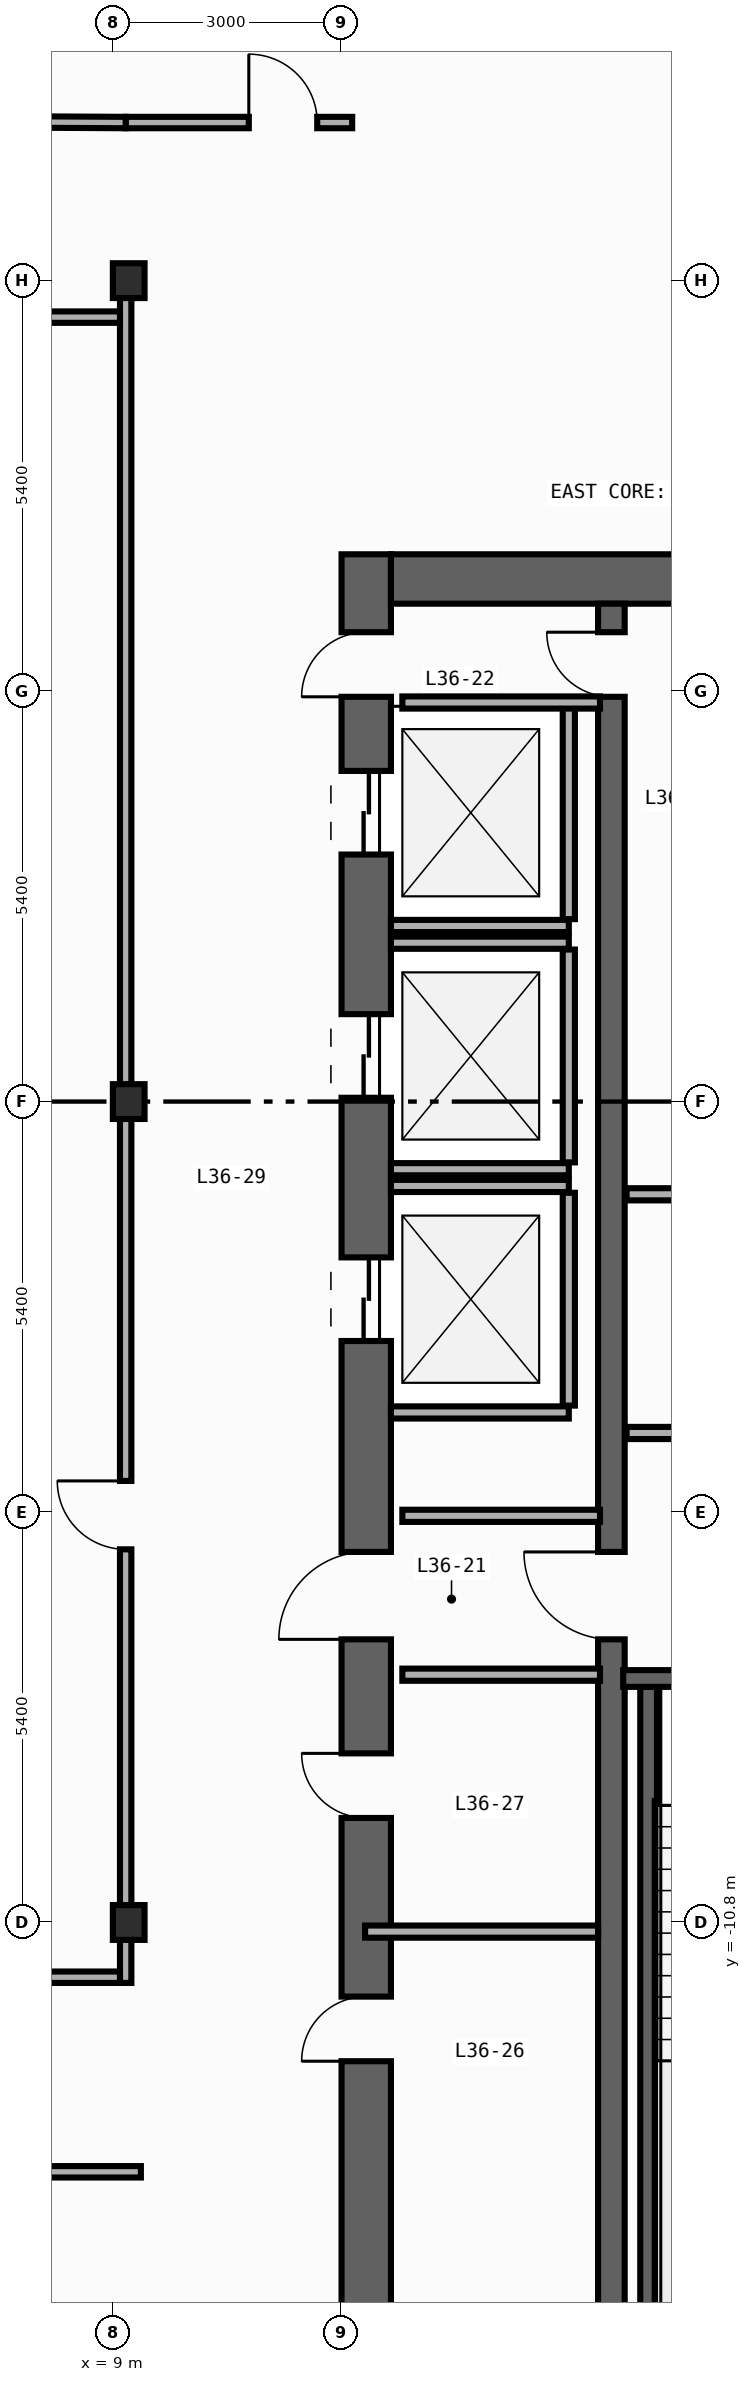
"""IFC4 building model, lengths in metres.
Left out: names, types, materials, properties, quantities, classifications, styles, units other than length and angle.
Written with IfcOpenShell. Run it as: python <this file> out.ifc"""

import sys

from ifc_helpers import new_model, si_unit, direction, frame, frame_2d, origin, origin_2d, place, context, subcontext, project, spatial, rectangle, i_section, extrude, element, fill, save


model = new_model("IFC4")
c1 = context("Model", 3, precision=1e-05, world=origin(), true_north=direction((0.0, 1.0)))
c2 = subcontext(c1, "Body", "Model", "MODEL_VIEW")
j1 = project(units=[si_unit("LENGTHUNIT", "METRE"), si_unit("PLANEANGLEUNIT", "RADIAN")], contexts=[c1])
p1 = place(None, origin())
s1 = spatial("IfcSite", under=j1, at=p1, CompositionType="ELEMENT")
p2 = place(p1, origin())
s2 = spatial("IfcBuilding", under=s1, at=p2, CompositionType="ELEMENT")
p3 = place(p2, frame((0.0, 0.0, 160.4)))
s3 = spatial("IfcBuildingStorey", under=s2, at=p3, CompositionType="ELEMENT", Elevation=160.4)
p4 = place(p3, frame((12.325, -19.8, 0.0), z_axis=(0.0, 0.0, 1.0), x_axis=(0.0, 1.0, 0.0)))
e1 = element("IfcWall", 1, at=p4, inside=s3, PredefinedType="SHEAR", context=c2, shape_type="SweptSolid", body=[
    extrude(rectangle(XDim=27.0, YDim=0.65, at=frame_2d((13.5, 0.0))), origin(), (0.0, 0.0, 1.0), 4.34),
])
p5 = place(p4, frame((23.05, 0.0, 0.0)))
e2 = element("IfcOpeningElement", 2, at=p5, cuts=e1, PredefinedType="OPENING", context=c2, shape_type="SweptSolid", body=[
    extrude(rectangle(XDim=1.1, YDim=2.2, at=frame_2d((0.55, 1.1))), frame((0.0, 0.335, 0.0), z_axis=(0.0, -1.0, 0.0), x_axis=(1.0, 0.0, 0.0)), (0.0, 0.0, 1.0), 0.67),
])
p6 = place(p4, frame((19.85, 0.0, 0.0)))
e3 = element("IfcOpeningElement", 3, at=p6, cuts=e1, PredefinedType="OPENING", context=c2, shape_type="SweptSolid", body=[
    extrude(rectangle(XDim=1.1, YDim=2.2, at=frame_2d((0.55, 1.1))), frame((0.0, 0.335, 0.0), z_axis=(0.0, -1.0, 0.0), x_axis=(1.0, 0.0, 0.0)), (0.0, 0.0, 1.0), 0.67),
])
p7 = place(p4, frame((16.65, 0.0, 0.0)))
e4 = element("IfcOpeningElement", 4, at=p7, cuts=e1, PredefinedType="OPENING", context=c2, shape_type="SweptSolid", body=[
    extrude(rectangle(XDim=1.1, YDim=2.2, at=frame_2d((0.55, 1.1))), frame((0.0, 0.335, 0.0), z_axis=(0.0, -1.0, 0.0), x_axis=(1.0, 0.0, 0.0)), (0.0, 0.0, 1.0), 0.67),
])
p8 = place(p4, frame((7.175, 0.0, 0.0)))
e5 = element("IfcOpeningElement", 5, at=p8, cuts=e1, PredefinedType="OPENING", context=c2, shape_type="SweptSolid", body=[
    extrude(rectangle(XDim=0.85, YDim=2.1, at=frame_2d((0.425, 1.05))), frame((0.0, 0.335, 0.0), z_axis=(0.0, -1.0, 0.0), x_axis=(1.0, 0.0, 0.0)), (0.0, 0.0, 1.0), 0.67),
])
p9 = place(p4, frame((10.375, 0.0, 0.0)))
e6 = element("IfcOpeningElement", 6, at=p9, cuts=e1, PredefinedType="OPENING", context=c2, shape_type="SweptSolid", body=[
    extrude(rectangle(XDim=0.85, YDim=2.1, at=frame_2d((0.425, 1.05))), frame((0.0, 0.335, 0.0), z_axis=(0.0, -1.0, 0.0), x_axis=(1.0, 0.0, 0.0)), (0.0, 0.0, 1.0), 0.67),
])
p10 = place(p4, frame((12.725, 0.0, 0.0)))
e7 = element("IfcOpeningElement", 7, at=p10, cuts=e1, PredefinedType="OPENING", context=c2, shape_type="SweptSolid", body=[
    extrude(rectangle(XDim=1.15, YDim=2.2, at=frame_2d((0.575, 1.1))), frame((0.0, 0.335, 0.0), z_axis=(0.0, -1.0, 0.0), x_axis=(1.0, 0.0, 0.0)), (0.0, 0.0, 1.0), 0.67),
])
p11 = place(p4, frame((25.125, 0.0, 0.0)))
e8 = element("IfcOpeningElement", 8, at=p11, cuts=e1, PredefinedType="OPENING", context=c2, shape_type="SweptSolid", body=[
    extrude(rectangle(XDim=0.85, YDim=2.1, at=frame_2d((0.425, 1.05))), frame((0.0, 0.335, 0.0), z_axis=(0.0, -1.0, 0.0), x_axis=(1.0, 0.0, 0.0)), (0.0, 0.0, 1.0), 0.67),
])
p12 = place(p3, frame((12.65, 6.875, 0.0), z_axis=(0.0, 0.0, 1.0), x_axis=(1.0, 0.0, 0.0)))
e9 = element("IfcWall", 9, at=p12, inside=s3, PredefinedType="SHEAR", context=c2, shape_type="SweptSolid", body=[
    extrude(rectangle(XDim=7.1, YDim=0.65, at=frame_2d((3.55, 0.0))), origin(), (0.0, 0.0, 1.0), 4.34),
])
p13 = place(p3, frame((15.55, -19.15, 0.0), z_axis=(0.0, 0.0, 1.0), x_axis=(0.0, 1.0, 0.0)))
e10 = element("IfcWall", 10, at=p13, inside=s3, PredefinedType="SHEAR", context=c2, shape_type="SweptSolid", body=[
    extrude(rectangle(XDim=25.7, YDim=0.35, at=frame_2d((12.85, 0.0))), origin(), (0.0, 0.0, 1.0), 4.34),
])
p14 = place(p13, frame((12.075, 0.0, 0.0)))
e11 = element("IfcOpeningElement", 11, at=p14, cuts=e10, PredefinedType="OPENING", context=c2, shape_type="SweptSolid", body=[
    extrude(rectangle(XDim=1.15, YDim=2.2, at=frame_2d((0.575, 1.1))), frame((0.0, 0.185, 0.0), z_axis=(0.0, -1.0, 0.0), x_axis=(1.0, 0.0, 0.0)), (0.0, 0.0, 1.0), 0.37),
])
p15 = place(p13, frame((24.475, 0.0, 0.0)))
e12 = element("IfcOpeningElement", 12, at=p15, cuts=e10, PredefinedType="OPENING", context=c2, shape_type="SweptSolid", body=[
    extrude(rectangle(XDim=0.85, YDim=2.1, at=frame_2d((0.425, 1.05))), frame((0.0, 0.185, 0.0), z_axis=(0.0, -1.0, 0.0), x_axis=(1.0, 0.0, 0.0)), (0.0, 0.0, 1.0), 0.37),
])
p16 = place(p3, frame((16.04, -19.01, 0.0), z_axis=(0.0, 0.0, 1.0), x_axis=(0.0, 1.0, 0.0)))
e13 = element("IfcWall", 13, at=p16, inside=s3, PredefinedType="SHEAR", context=c2, shape_type="SweptSolid", body=[
    extrude(rectangle(XDim=11.42, YDim=0.22, at=frame_2d((5.71, 0.0))), origin(), (0.0, 0.0, 1.0), 4.34),
])
p17 = place(p3, frame((19.77, -7.59, 0.0), z_axis=(0.0, 0.0, 1.0), x_axis=(-1.0, 0.0, 0.0)))
e14 = element("IfcWall", 14, at=p17, inside=s3, PredefinedType="SHEAR", context=c2, shape_type="SweptSolid", body=[
    extrude(rectangle(XDim=4.065, YDim=0.22, at=frame_2d((2.032, 0.0))), origin(), (0.0, 0.0, 1.0), 4.34),
])
p18 = place(p17, frame((1.08, 0.0, 0.0)))
e15 = element("IfcOpeningElement", 15, at=p18, cuts=e14, PredefinedType="OPENING", context=c2, shape_type="SweptSolid", body=[
    extrude(rectangle(XDim=1.1, YDim=2.2, at=frame_2d((0.55, 1.1))), frame((0.0, 0.12, 0.0), z_axis=(0.0, -1.0, 0.0), x_axis=(1.0, 0.0, 0.0)), (0.0, 0.0, 1.0), 0.24),
])
for number, where, z_axis, x_axis in (
    (16, (9.2, -10.8, 0.0), (0.0, 0.0, 1.0), (1.0, 0.0, 0.0)),
    (17, (9.2, 0.0, 0.0), (0.0, 0.0, 1.0), (1.0, 0.0, 0.0)),
    (18, (9.2, 10.8, 0.0), (0.0, 0.0, 1.0), (1.0, 0.0, 0.0)),
):
    element("IfcColumn", number, at=place(p3, frame(where, z_axis=z_axis, x_axis=x_axis)), inside=s3, PredefinedType="COLUMN", context=c2, shape_type="SweptSolid", body=[
        extrude(i_section(OverallWidth=0.417, OverallDepth=0.458, WebThickness=0.03, FlangeThickness=0.05, FilletRadius=0.022, at=origin_2d()), origin(), (0.0, 0.0, 1.0), 4.6),
    ])
p19 = place(p3, frame((12.65, 2.31, 0.0), z_axis=(0.0, 0.0, 1.0), x_axis=(1.0, 0.0, 0.0)))
e19 = element("IfcWall", 19, at=p19, inside=s3, PredefinedType="STANDARD", context=c2, shape_type="SweptSolid", body=[
    extrude(rectangle(XDim=2.34, YDim=0.16, at=frame_2d((1.17, 0.0))), origin(), (0.0, 0.0, 1.0), 4.34),
])
p20 = place(p3, frame((14.99, 2.4, 0.0), z_axis=(0.0, 0.0, 1.0), x_axis=(0.0, 1.0, 0.0)))
e20 = element("IfcWall", 20, at=p20, inside=s3, PredefinedType="STANDARD", context=c2, shape_type="SweptSolid", body=[
    extrude(rectangle(XDim=2.8, YDim=0.16, at=frame_2d((1.4, 0.0))), origin(), (0.0, 0.0, 1.0), 4.34),
])
for number, where, z_axis, x_axis in (
    (21, (12.65, -0.89, 0.0), (0.0, 0.0, 1.0), (1.0, 0.0, 0.0)),
    (22, (12.65, 2.09, 0.0), (0.0, 0.0, 1.0), (1.0, 0.0, 0.0)),
):
    element("IfcWall", number, at=place(p3, frame(where, z_axis=z_axis, x_axis=x_axis)), inside=s3, PredefinedType="STANDARD", context=c2, shape_type="SweptSolid", body=[
        extrude(rectangle(XDim=2.34, YDim=0.16, at=frame_2d((1.17, 0.0))), origin(), (0.0, 0.0, 1.0), 4.34),
    ])
p21 = place(p3, frame((14.99, -0.8, 0.0), z_axis=(0.0, 0.0, 1.0), x_axis=(0.0, 1.0, 0.0)))
e23 = element("IfcWall", 23, at=p21, inside=s3, PredefinedType="STANDARD", context=c2, shape_type="SweptSolid", body=[
    extrude(rectangle(XDim=2.8, YDim=0.16, at=frame_2d((1.4, 0.0))), origin(), (0.0, 0.0, 1.0), 4.34),
])
for number, where, z_axis, x_axis in (
    (24, (12.65, -4.09, 0.0), (0.0, 0.0, 1.0), (1.0, 0.0, 0.0)),
    (25, (12.65, -1.11, 0.0), (0.0, 0.0, 1.0), (1.0, 0.0, 0.0)),
):
    element("IfcWall", number, at=place(p3, frame(where, z_axis=z_axis, x_axis=x_axis)), inside=s3, PredefinedType="STANDARD", context=c2, shape_type="SweptSolid", body=[
        extrude(rectangle(XDim=2.34, YDim=0.16, at=frame_2d((1.17, 0.0))), origin(), (0.0, 0.0, 1.0), 4.34),
    ])
p22 = place(p3, frame((14.99, -4.0, 0.0), z_axis=(0.0, 0.0, 1.0), x_axis=(0.0, 1.0, 0.0)))
e26 = element("IfcWall", 26, at=p22, inside=s3, PredefinedType="STANDARD", context=c2, shape_type="SweptSolid", body=[
    extrude(rectangle(XDim=2.8, YDim=0.16, at=frame_2d((1.4, 0.0))), origin(), (0.0, 0.0, 1.0), 4.34),
])
p23 = place(p3, frame((15.75, -4.36, 0.0), z_axis=(0.0, 0.0, 1.0), x_axis=(1.0, 0.0, 0.0)))
e27 = element("IfcWall", 27, at=p23, inside=s3, PredefinedType="STANDARD", context=c2, shape_type="SweptSolid", body=[
    extrude(rectangle(XDim=3.8, YDim=0.16, at=frame_2d((1.9, 0.0))), origin(), (0.0, 0.0, 1.0), 4.34),
])
p24 = place(p23, frame((1.47, 0.0, 0.0)))
e28 = element("IfcOpeningElement", 28, at=p24, cuts=e27, PredefinedType="OPENING", context=c2, shape_type="SweptSolid", body=[
    extrude(rectangle(XDim=1.15, YDim=2.2, at=frame_2d((0.575, 1.1))), frame((0.0, 0.09, 0.0), z_axis=(0.0, -1.0, 0.0), x_axis=(1.0, 0.0, 0.0)), (0.0, 0.0, 1.0), 0.18),
])
p25 = place(p3, frame((15.75, -1.22, 0.0), z_axis=(0.0, 0.0, 1.0), x_axis=(1.0, 0.0, 0.0)))
e29 = element("IfcWall", 29, at=p25, inside=s3, PredefinedType="STANDARD", context=c2, shape_type="SweptSolid", body=[
    extrude(rectangle(XDim=3.8, YDim=0.16, at=frame_2d((1.9, 0.0))), origin(), (0.0, 0.0, 1.0), 4.34),
])
for number, where, z_axis, x_axis in (
    (30, (12.8, -5.45, 0.0), (0.0, 0.0, 1.0), (1.0, 0.0, 0.0)),
    (31, (12.8, -7.54, 0.0), (0.0, 0.0, 1.0), (1.0, 0.0, 0.0)),
    (32, (12.8, 5.25, 0.0), (0.0, 0.0, 1.0), (1.0, 0.0, 0.0)),
):
    element("IfcWall", number, at=place(p3, frame(where, z_axis=z_axis, x_axis=x_axis)), inside=s3, PredefinedType="STANDARD", context=c2, shape_type="SweptSolid", body=[
        extrude(rectangle(XDim=2.6, YDim=0.16, at=frame_2d((1.3, 0.0))), origin(), (0.0, 0.0, 1.0), 4.34),
    ])
p26 = place(p3, frame((12.31, -10.92, 0.0), z_axis=(0.0, 0.0, 1.0), x_axis=(1.0, 0.0, 0.0)))
e33 = element("IfcWall", 33, at=p26, inside=s3, PredefinedType="PARTITIONING", context=c2, shape_type="SweptSolid", body=[
    extrude(rectangle(XDim=3.065, YDim=0.16, at=frame_2d((1.532, 0.0))), origin(), (0.0, 0.0, 1.0), 3.752),
])
p27 = place(p3, frame((9.16, -11.595, 0.0), z_axis=(0.0, 0.0, 1.0), x_axis=(0.0, 1.0, 0.0)))
e34 = element("IfcWall", 34, at=p27, inside=s3, PredefinedType="PARTITIONING", context=c2, shape_type="SweptSolid", body=[
    extrude(rectangle(XDim=22.17, YDim=0.15, at=frame_2d((11.085, 0.0))), origin(), (0.0, 0.0, 1.0), 3.752),
])
p28 = place(p27, frame((5.704, 0.0, 0.0)))
e35 = element("IfcOpeningElement", 35, at=p28, cuts=e34, PredefinedType="OPENING", context=c2, shape_type="SweptSolid", body=[
    extrude(rectangle(XDim=0.9, YDim=2.15, at=frame_2d((0.45, 1.075))), frame((0.0, 0.085, 0.0), z_axis=(0.0, -1.0, 0.0), x_axis=(1.0, 0.0, 0.0)), (0.0, 0.0, 1.0), 0.17),
])
p29 = place(p3, frame((9.16, 12.88, 0.0), z_axis=(0.0, 0.0, 1.0), x_axis=(1.0, 0.0, 0.0)))
e36 = element("IfcWall", 36, at=p29, inside=s3, PredefinedType="PARTITIONING", context=c2, shape_type="SweptSolid", body=[
    extrude(rectangle(XDim=2.98, YDim=0.15, at=frame_2d((1.49, 0.0))), origin(), (0.0, 0.0, 1.0), 4.34),
])
p30 = place(p29, frame((1.62, 0.0, 0.0)))
e37 = element("IfcOpeningElement", 37, at=p30, cuts=e36, PredefinedType="OPENING", context=c2, shape_type="SweptSolid", body=[
    extrude(rectangle(XDim=0.9, YDim=2.15, at=frame_2d((0.45, 1.075))), frame((0.0, 0.085, 0.0), z_axis=(0.0, -1.0, 0.0), x_axis=(1.0, 0.0, 0.0)), (0.0, 0.0, 1.0), 0.17),
])
p31 = place(p3, frame((-9.085, -11.52, 0.0), z_axis=(0.0, 0.0, 1.0), x_axis=(1.0, 0.0, 0.0)))
e38 = element("IfcWall", 38, at=p31, inside=s3, PredefinedType="PARTITIONING", context=c2, shape_type="SweptSolid", body=[
    extrude(rectangle(XDim=18.17, YDim=0.15, at=frame_2d((9.085, 0.0))), origin(), (0.0, 0.0, 1.0), 4.34),
])
p32 = place(p31, frame((6.516, 0.0, 0.0)))
e39 = element("IfcOpeningElement", 39, at=p32, cuts=e38, PredefinedType="OPENING", context=c2, shape_type="SweptSolid", body=[
    extrude(rectangle(XDim=0.9, YDim=2.15, at=frame_2d((0.45, 1.075))), frame((0.0, 0.085, 0.0), z_axis=(0.0, -1.0, 0.0), x_axis=(1.0, 0.0, 0.0)), (0.0, 0.0, 1.0), 0.17),
])
p33 = place(p3, frame((2.08, -14.08, 0.0), z_axis=(0.0, 0.0, 1.0), x_axis=(1.0, 0.0, 0.0)))
e40 = element("IfcWall", 40, at=p33, inside=s3, PredefinedType="PARTITIONING", context=c2, shape_type="SweptSolid", body=[
    extrude(rectangle(XDim=7.28, YDim=0.15, at=frame_2d((3.64, 0.0))), origin(), (0.0, 0.0, 1.0), 4.34),
])
p34 = place(p33, frame((3.493, 0.0, 0.0)))
e41 = element("IfcOpeningElement", 41, at=p34, cuts=e40, PredefinedType="OPENING", context=c2, shape_type="SweptSolid", body=[
    extrude(rectangle(XDim=0.9, YDim=2.15, at=frame_2d((0.45, 1.075))), frame((0.0, 0.085, 0.0), z_axis=(0.0, -1.0, 0.0), x_axis=(1.0, 0.0, 0.0)), (0.0, 0.0, 1.0), 0.17),
])
p35 = place(p3, frame((-9.085, 10.32, 0.0), z_axis=(0.0, 0.0, 1.0), x_axis=(1.0, 0.0, 0.0)))
e42 = element("IfcWall", 42, at=p35, inside=s3, PredefinedType="PARTITIONING", context=c2, shape_type="SweptSolid", body=[
    extrude(rectangle(XDim=18.17, YDim=0.15, at=frame_2d((9.085, 0.0))), origin(), (0.0, 0.0, 1.0), 4.34),
])
p36 = place(p35, frame((7.525, 0.0, 0.0)))
e43 = element("IfcOpeningElement", 43, at=p36, cuts=e42, PredefinedType="OPENING", context=c2, shape_type="SweptSolid", body=[
    extrude(rectangle(XDim=0.9, YDim=2.15, at=frame_2d((0.45, 1.075))), frame((0.0, 0.085, 0.0), z_axis=(0.0, -1.0, 0.0), x_axis=(1.0, 0.0, 0.0)), (0.0, 0.0, 1.0), 0.17),
])
p37 = place(p3, frame((-9.16, 12.98, 0.0), z_axis=(0.0, 0.0, 1.0), x_axis=(0.999985073242, -0.005463816733, 0.0)))
e44 = element("IfcWall", 44, at=p37, inside=s3, PredefinedType="PARTITIONING", context=c2, shape_type="SweptSolid", body=[
    extrude(rectangle(XDim=18.32, YDim=0.15, at=frame_2d((9.16, 0.0))), origin(), (0.0, 0.0, 1.0), 4.34),
])
p38 = place(p37, frame((10.924, 0.0, 0.0)))
e45 = element("IfcOpeningElement", 45, at=p38, cuts=e44, PredefinedType="OPENING", context=c2, shape_type="SweptSolid", body=[
    extrude(rectangle(XDim=0.9, YDim=2.15, at=frame_2d((0.45, 1.075))), frame((0.0, 0.085, 0.0), z_axis=(0.0, -1.0, 0.0), x_axis=(1.0, 0.0, 0.0)), (0.0, 0.0, 1.0), 0.17),
])
p39 = place(p5, origin())
e46 = element("IfcDoor", 46, at=p39, inside=s3, OperationType="DOUBLE_DOOR_SLIDING", PredefinedType="DOOR", context=c2, shape_type="SweptSolid", body=[
    extrude(rectangle(XDim=1.1, YDim=2.2, at=frame_2d((0.55, 1.1))), frame((0.0, 0.025, 0.0), z_axis=(0.0, -1.0, 0.0), x_axis=(1.0, 0.0, 0.0)), (0.0, 0.0, 1.0), 0.05),
])
fill(e2, e46)
p40 = place(p6, origin())
e47 = element("IfcDoor", 47, at=p40, inside=s3, OperationType="DOUBLE_DOOR_SLIDING", PredefinedType="DOOR", context=c2, shape_type="SweptSolid", body=[
    extrude(rectangle(XDim=1.1, YDim=2.2, at=frame_2d((0.55, 1.1))), frame((0.0, 0.025, 0.0), z_axis=(0.0, -1.0, 0.0), x_axis=(1.0, 0.0, 0.0)), (0.0, 0.0, 1.0), 0.05),
])
fill(e3, e47)
p41 = place(p7, origin())
e48 = element("IfcDoor", 48, at=p41, inside=s3, OperationType="DOUBLE_DOOR_SLIDING", PredefinedType="DOOR", context=c2, shape_type="SweptSolid", body=[
    extrude(rectangle(XDim=1.1, YDim=2.2, at=frame_2d((0.55, 1.1))), frame((0.0, 0.025, 0.0), z_axis=(0.0, -1.0, 0.0), x_axis=(1.0, 0.0, 0.0)), (0.0, 0.0, 1.0), 0.05),
])
fill(e4, e48)
p42 = place(p8, origin())
e49 = element("IfcDoor", 49, at=p42, inside=s3, OperationType="SINGLE_SWING_LEFT", PredefinedType="DOOR", context=c2, shape_type="SweptSolid", body=[
    extrude(rectangle(XDim=0.85, YDim=2.1, at=frame_2d((0.425, 1.05))), frame((0.0, 0.025, 0.0), z_axis=(0.0, -1.0, 0.0), x_axis=(1.0, 0.0, 0.0)), (0.0, 0.0, 1.0), 0.05),
])
fill(e5, e49)
p43 = place(p9, origin())
e50 = element("IfcDoor", 50, at=p43, inside=s3, OperationType="SINGLE_SWING_RIGHT", PredefinedType="DOOR", context=c2, shape_type="SweptSolid", body=[
    extrude(rectangle(XDim=0.85, YDim=2.1, at=frame_2d((0.425, 1.05))), frame((0.0, 0.025, 0.0), z_axis=(0.0, -1.0, 0.0), x_axis=(1.0, 0.0, 0.0)), (0.0, 0.0, 1.0), 0.05),
])
fill(e6, e50)
p44 = place(p10, origin())
e51 = element("IfcDoor", 51, at=p44, inside=s3, OperationType="SINGLE_SWING_LEFT", PredefinedType="DOOR", context=c2, shape_type="SweptSolid", body=[
    extrude(rectangle(XDim=1.15, YDim=2.2, at=frame_2d((0.575, 1.1))), frame((0.0, 0.025, 0.0), z_axis=(0.0, -1.0, 0.0), x_axis=(1.0, 0.0, 0.0)), (0.0, 0.0, 1.0), 0.05),
])
fill(e7, e51)
p45 = place(p14, origin())
e52 = element("IfcDoor", 52, at=p45, inside=s3, OperationType="SINGLE_SWING_RIGHT", PredefinedType="DOOR", context=c2, shape_type="SweptSolid", body=[
    extrude(rectangle(XDim=1.15, YDim=2.2, at=frame_2d((0.575, 1.1))), frame((0.0, 0.025, 0.0), z_axis=(0.0, -1.0, 0.0), x_axis=(1.0, 0.0, 0.0)), (0.0, 0.0, 1.0), 0.05),
])
fill(e11, e52)
p46 = place(p11, origin())
e53 = element("IfcDoor", 53, at=p46, inside=s3, OperationType="SINGLE_SWING_LEFT", PredefinedType="DOOR", context=c2, shape_type="SweptSolid", body=[
    extrude(rectangle(XDim=0.85, YDim=2.1, at=frame_2d((0.425, 1.05))), frame((0.0, 0.025, 0.0), z_axis=(0.0, -1.0, 0.0), x_axis=(1.0, 0.0, 0.0)), (0.0, 0.0, 1.0), 0.05),
])
fill(e8, e53)
p47 = place(p15, origin())
e54 = element("IfcDoor", 54, at=p47, inside=s3, OperationType="SINGLE_SWING_RIGHT", PredefinedType="DOOR", context=c2, shape_type="SweptSolid", body=[
    extrude(rectangle(XDim=0.85, YDim=2.1, at=frame_2d((0.425, 1.05))), frame((0.0, 0.025, 0.0), z_axis=(0.0, -1.0, 0.0), x_axis=(1.0, 0.0, 0.0)), (0.0, 0.0, 1.0), 0.05),
])
fill(e12, e54)
p48 = place(p28, origin())
e55 = element("IfcDoor", 55, at=p48, inside=s3, OperationType="SINGLE_SWING_RIGHT", PredefinedType="DOOR", context=c2, shape_type="SweptSolid", body=[
    extrude(rectangle(XDim=0.9, YDim=2.15, at=frame_2d((0.45, 1.075))), frame((0.0, 0.025, 0.0), z_axis=(0.0, -1.0, 0.0), x_axis=(1.0, 0.0, 0.0)), (0.0, 0.0, 1.0), 0.05),
])
fill(e35, e55)
p49 = place(p30, origin())
e56 = element("IfcDoor", 56, at=p49, inside=s3, OperationType="SINGLE_SWING_LEFT", PredefinedType="DOOR", context=c2, shape_type="SweptSolid", body=[
    extrude(rectangle(XDim=0.9, YDim=2.15, at=frame_2d((0.45, 1.075))), frame((0.0, 0.025, 0.0), z_axis=(0.0, -1.0, 0.0), x_axis=(1.0, 0.0, 0.0)), (0.0, 0.0, 1.0), 0.05),
])
fill(e37, e56)
save(model, sys.argv[1])
